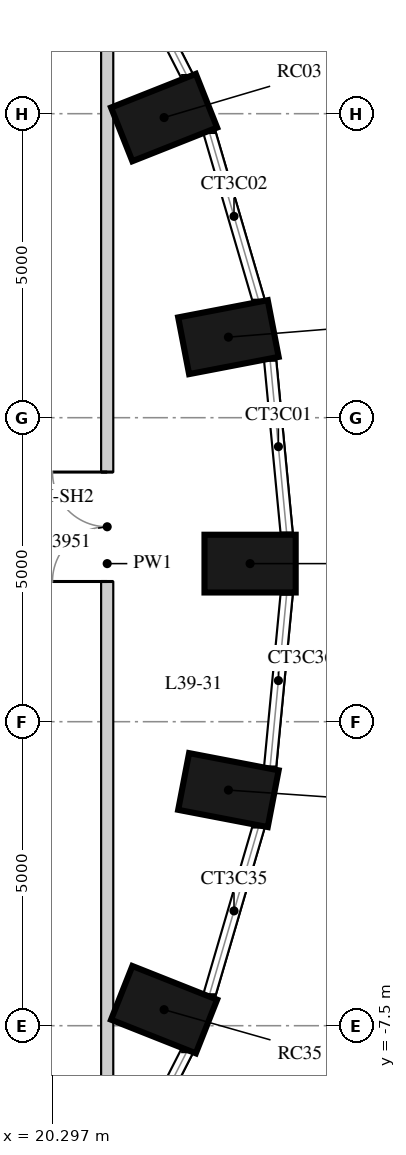
"""IFC4 building model, lengths in metres.
Left out: names, types, materials, properties, quantities, classifications, styles, units other than length and angle.
Written with IfcOpenShell. Run it as: python <this file> out.ifc"""

import sys

from ifc_helpers import new_model, si_unit, direction, frame, frame_2d, origin, origin_2d, place, context, subcontext, project, spatial, rectangle, extrude, element, fill, save


model = new_model("IFC4")
c1 = context("Model", 3, precision=1e-05, world=origin(), true_north=direction((0.0, 1.0)))
c2 = subcontext(c1, "Body", "Model", "MODEL_VIEW")
j1 = project(units=[si_unit("LENGTHUNIT", "METRE"), si_unit("PLANEANGLEUNIT", "RADIAN")], contexts=[c1])
p1 = place(None, origin())
s1 = spatial("IfcSite", under=j1, at=p1, CompositionType="ELEMENT")
p2 = place(p1, origin())
s2 = spatial("IfcBuilding", under=s1, at=p2, CompositionType="ELEMENT")
p3 = place(p2, frame((0.0, 0.0, 139.6)))
s3 = spatial("IfcBuildingStorey", under=s2, at=p3, CompositionType="ELEMENT", Elevation=139.6)
for number, where, z_axis, x_axis in (
    (1, (23.55, 0.1, 0.0), (0.0, 0.0, 1.0), (1.0, 0.0, 0.0)),
    (2, (23.194, 3.825, 0.0), (0.0, 0.0, 1.0), (0.982, 0.189, 0.0)),
    (3, (22.136, 7.436, 0.0), (0.0, 0.0, 1.0), (0.93, 0.369, 0.0)),
    (4, (22.136, -7.236, 0.0), (0.0, 0.0, 1.0), (0.93, -0.369, 0.0)),
    (5, (23.194, -3.625, 0.0), (0.0, 0.0, 1.0), (0.982, -0.189, 0.0)),
):
    element("IfcColumn", number, at=place(p3, frame(where, z_axis=z_axis, x_axis=x_axis)), inside=s3, PredefinedType="COLUMN", context=c2, shape_type="SweptSolid", body=[
        extrude(rectangle(XDim=1.5, YDim=0.95, at=origin_2d()), origin(), (0.0, 0.0, 1.0), 5.5),
    ])
p4 = place(p3, frame((21.2, 9.883, 0.0), z_axis=(0.0, 0.0, 1.0), x_axis=(0.0, -1.0, 0.0)))
e6 = element("IfcWall", 6, at=p4, inside=s3, PredefinedType="PARTITIONING", context=c2, shape_type="SweptSolid", body=[
    extrude(rectangle(XDim=19.566, YDim=0.2, at=frame_2d((9.783, 0.0))), origin(), (0.0, 0.0, 1.0), 5.22),
])
p5 = place(p4, frame((8.277, 0.0, 0.0)))
e7 = element("IfcOpeningElement", 7, at=p5, cuts=e6, PredefinedType="OPENING", context=c2, shape_type="SweptSolid", body=[
    extrude(rectangle(XDim=1.8, YDim=2.1, at=frame_2d((0.9, 1.05))), frame((0.0, 0.11, 0.0), z_axis=(0.0, -1.0, 0.0), x_axis=(1.0, 0.0, 0.0)), (0.0, 0.0, 1.0), 0.22),
])
p6 = place(p5, origin())
e8 = element("IfcDoor", 8, at=p6, inside=s3, OperationType="DOUBLE_DOOR_SINGLE_SWING", PredefinedType="DOOR", context=c2, shape_type="SweptSolid", body=[
    extrude(rectangle(XDim=1.8, YDim=2.1, at=frame_2d((0.9, 1.05))), frame((0.0, 0.025, 0.0), z_axis=(0.0, -1.0, 0.0), x_axis=(1.0, 0.0, 0.0)), (0.0, 0.0, 1.0), 0.05),
])
fill(e7, e8)
save(model, sys.argv[1])
